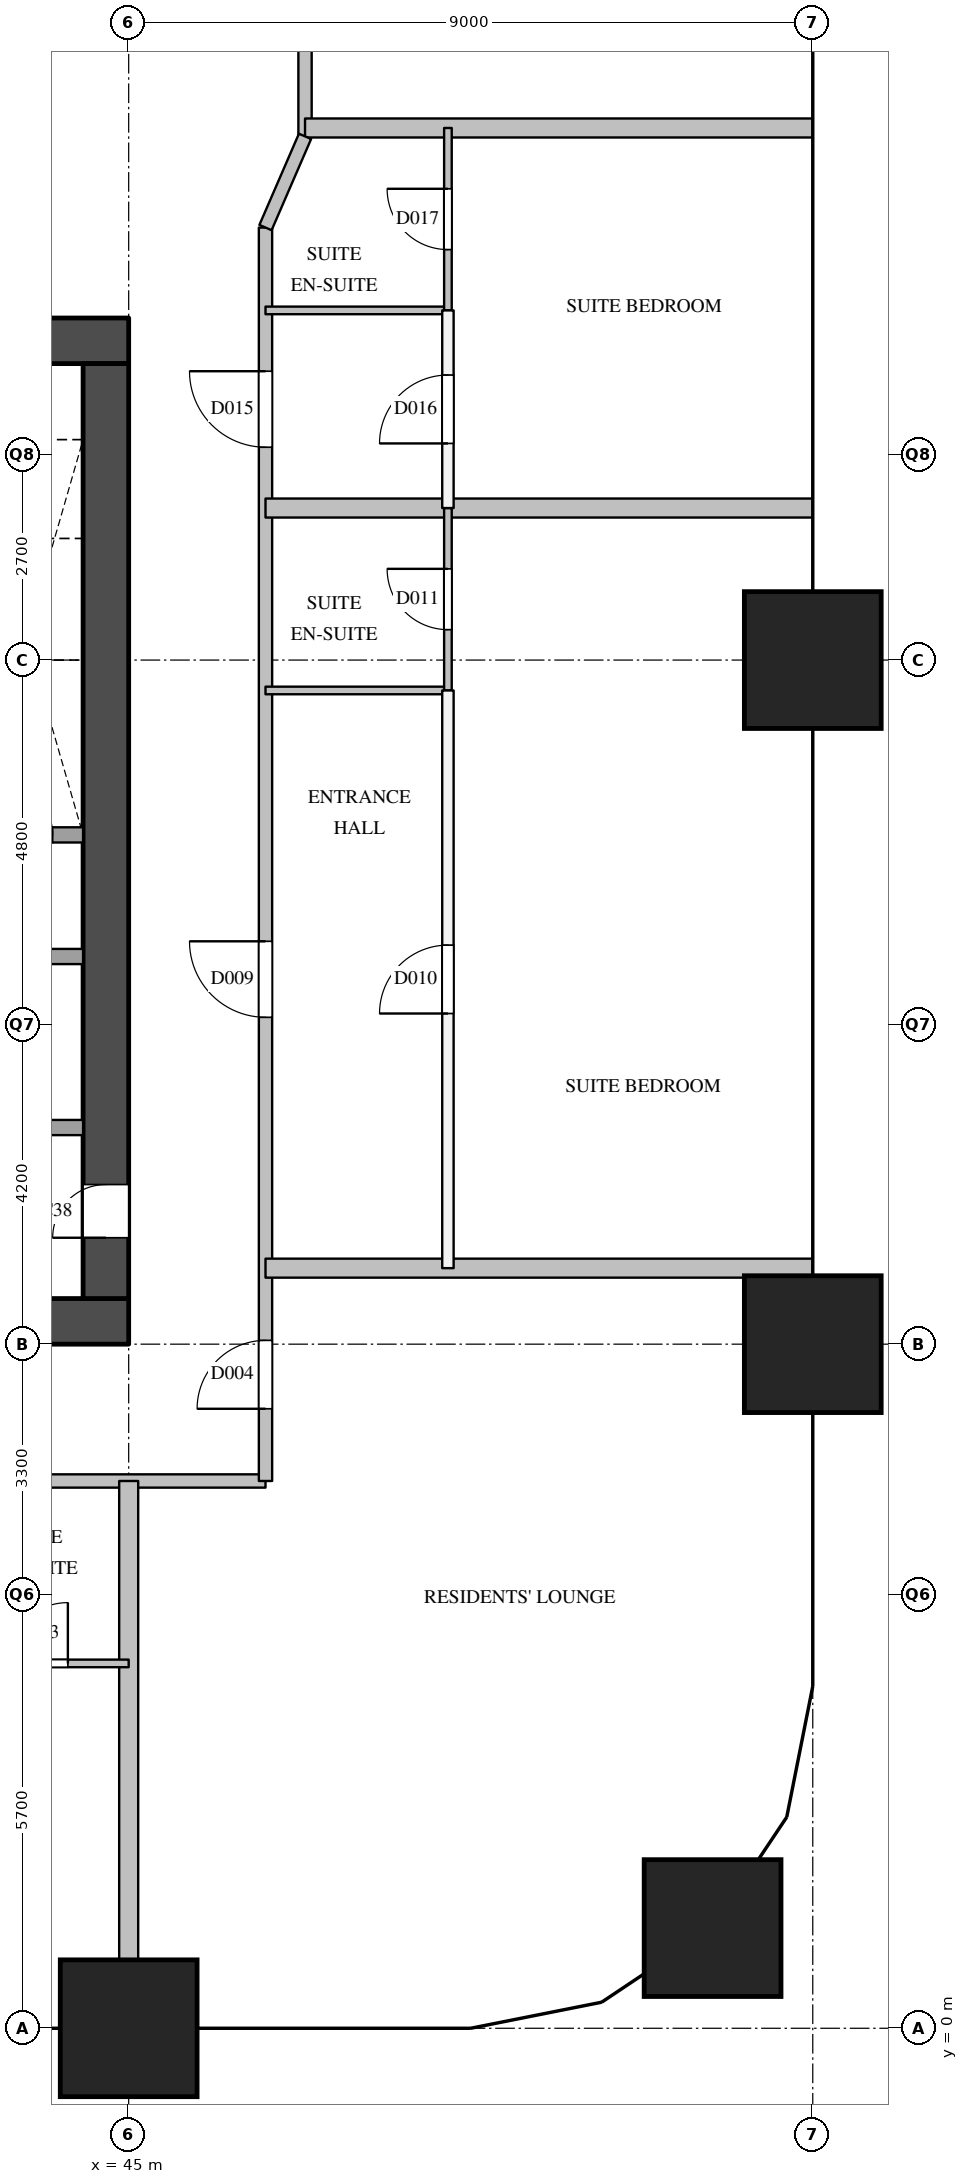
"""IFC4 building model, lengths in metres.
Left out: names, types, materials, properties, quantities, classifications, styles, units other than length and angle.
Written with IfcOpenShell. Run it as: python <this file> out.ifc"""

import sys

from ifc_helpers import new_model, si_unit, direction, frame, frame_2d, origin, origin_2d, place, context, subcontext, project, spatial, rectangle, extrude, element, fill, save


model = new_model("IFC4")
c1 = context("Model", 3, precision=1e-05, world=origin(), true_north=direction((0.0, 1.0)))
c2 = subcontext(c1, "Body", "Model", "MODEL_VIEW")
j1 = project(units=[si_unit("LENGTHUNIT", "METRE"), si_unit("PLANEANGLEUNIT", "RADIAN")], contexts=[c1])
p1 = place(None, origin())
s1 = spatial("IfcSite", under=j1, at=p1, CompositionType="ELEMENT")
p2 = place(p1, origin())
s2 = spatial("IfcBuilding", under=s1, at=p2, CompositionType="ELEMENT")
p3 = place(p2, frame((0.0, 0.0, 119.6)))
s3 = spatial("IfcBuildingStorey", under=s2, at=p3, CompositionType="ELEMENT", Elevation=119.6)
for number, where, z_axis, x_axis in (
    (1, (45.0, 0.0, 0.0), (0.0, 0.0, 1.0), (1.0, 0.0, 0.0)),
    (2, (52.682, 1.318, 0.0), (0.0, 0.0, 1.0), (1.0, 0.0, 0.0)),
    (3, (54.0, 9.0, 0.0), (0.0, 0.0, 1.0), (1.0, 0.0, 0.0)),
    (4, (54.0, 18.0, 0.0), (0.0, 0.0, 1.0), (1.0, 0.0, 0.0)),
):
    element("IfcColumn", number, at=place(p3, frame(where, z_axis=z_axis, x_axis=x_axis)), inside=s3, PredefinedType="COLUMN", context=c2, shape_type="SweptSolid", body=[
        extrude(rectangle(XDim=1.8, YDim=1.8, at=origin_2d()), origin(), (0.0, 0.0, 1.0), 3.8),
    ])
for number, where, z_axis, x_axis in (
    (5, (36.0, 9.3, 0.0), (0.0, 0.0, 1.0), (1.0, 0.0, 0.0)),
    (6, (36.0, 22.2, 0.0), (0.0, 0.0, 1.0), (1.0, 0.0, 0.0)),
):
    element("IfcWall", number, at=place(p3, frame(where, z_axis=z_axis, x_axis=x_axis)), inside=s3, PredefinedType="SHEAR", context=c2, shape_type="SweptSolid", body=[
        extrude(rectangle(XDim=9.0, YDim=0.6, at=frame_2d((4.5, 0.0))), origin(), (0.0, 0.0, 1.0), 3.3),
    ])
p4 = place(p3, frame((44.7, 9.6, 0.0), z_axis=(0.0, 0.0, 1.0), x_axis=(0.0, 1.0, 0.0)))
e7 = element("IfcWall", 7, at=p4, inside=s3, PredefinedType="SHEAR", context=c2, shape_type="SweptSolid", body=[
    extrude(rectangle(XDim=12.3, YDim=0.6, at=frame_2d((6.15, 0.0))), origin(), (0.0, 0.0, 1.0), 3.3),
])
p5 = place(p4, frame((0.8, 0.0, 0.0)))
e8 = element("IfcOpeningElement", 8, at=p5, cuts=e7, PredefinedType="OPENING", context=c2, shape_type="SweptSolid", body=[
    extrude(rectangle(XDim=0.7, YDim=2.1, at=frame_2d((0.35, 1.05))), frame((0.0, 0.31, 0.0), z_axis=(0.0, -1.0, 0.0), x_axis=(1.0, 0.0, 0.0)), (0.0, 0.0, 1.0), 0.62),
])
p6 = place(p3, frame((36.6, 11.85, 0.0), z_axis=(0.0, 0.0, 1.0), x_axis=(1.0, 0.0, 0.0)))
e9 = element("IfcWall", 9, at=p6, inside=s3, PredefinedType="SOLIDWALL", context=c2, shape_type="SweptSolid", body=[
    extrude(rectangle(XDim=7.8, YDim=0.2, at=frame_2d((3.9, 0.0))), origin(), (0.0, 0.0, 1.0), 3.3),
])
p7 = place(p3, frame((42.6, 14.1, 0.0), z_axis=(0.0, 0.0, 1.0), x_axis=(1.0, 0.0, 0.0)))
e10 = element("IfcWall", 10, at=p7, inside=s3, PredefinedType="SOLIDWALL", context=c2, shape_type="SweptSolid", body=[
    extrude(rectangle(XDim=1.8, YDim=0.2, at=frame_2d((0.9, 0.0))), origin(), (0.0, 0.0, 1.0), 3.3),
])
p8 = place(p7, frame((0.55, 0.0, 0.0)))
e11 = element("IfcOpeningElement", 11, at=p8, cuts=e10, PredefinedType="OPENING", context=c2, shape_type="SweptSolid", body=[
    extrude(rectangle(XDim=0.7, YDim=2.1, at=frame_2d((0.35, 1.05))), frame((0.0, 0.11, 0.0), z_axis=(0.0, -1.0, 0.0), x_axis=(1.0, 0.0, 0.0)), (0.0, 0.0, 1.0), 0.22),
])
p9 = place(p3, frame((42.9, 15.7, 0.0), z_axis=(0.0, 0.0, 1.0), x_axis=(1.0, 0.0, 0.0)))
e12 = element("IfcWall", 12, at=p9, inside=s3, PredefinedType="SOLIDWALL", context=c2, shape_type="SweptSolid", body=[
    extrude(rectangle(XDim=1.5, YDim=0.2, at=frame_2d((0.75, 0.0))), origin(), (0.0, 0.0, 1.0), 3.3),
])
p10 = place(p9, frame((0.4, 0.0, 0.0)))
e13 = element("IfcOpeningElement", 13, at=p10, cuts=e12, PredefinedType="OPENING", context=c2, shape_type="SweptSolid", body=[
    extrude(rectangle(XDim=0.7, YDim=2.1, at=frame_2d((0.35, 1.05))), frame((0.0, 0.11, 0.0), z_axis=(0.0, -1.0, 0.0), x_axis=(1.0, 0.0, 0.0)), (0.0, 0.0, 1.0), 0.22),
])
p11 = place(p3, frame((34.2, 7.2, 0.0), z_axis=(0.0, 0.0, 1.0), x_axis=(1.0, 0.0, 0.0)))
e14 = element("IfcWall", 14, at=p11, inside=s3, PredefinedType="PARTITIONING", context=c2, shape_type="SweptSolid", body=[
    extrude(rectangle(XDim=12.6, YDim=0.175, at=frame_2d((6.3, 0.0))), origin(), (0.0, 0.0, 1.0), 3.3),
])
p12 = place(p11, frame((6.6, 0.0, 0.0)))
e15 = element("IfcOpeningElement", 15, at=p12, cuts=e14, PredefinedType="OPENING", context=c2, shape_type="SweptSolid", body=[
    extrude(rectangle(XDim=1.0, YDim=2.1, at=frame_2d((0.5, 1.05))), frame((0.0, 0.097, 0.0), z_axis=(0.0, -1.0, 0.0), x_axis=(1.0, 0.0, 0.0)), (0.0, 0.0, 1.0), 0.195),
])
p13 = place(p11, frame((2.8, 0.0, 0.0)))
e16 = element("IfcOpeningElement", 16, at=p13, cuts=e14, PredefinedType="OPENING", context=c2, shape_type="SweptSolid", body=[
    extrude(rectangle(XDim=1.0, YDim=2.1, at=frame_2d((0.5, 1.05))), frame((0.0, 0.097, 0.0), z_axis=(0.0, -1.0, 0.0), x_axis=(1.0, 0.0, 0.0)), (0.0, 0.0, 1.0), 0.195),
])
p14 = place(p3, frame((46.8, 7.2, 0.0), z_axis=(0.0, 0.0, 1.0), x_axis=(0.0, 1.0, 0.0)))
e17 = element("IfcWall", 17, at=p14, inside=s3, PredefinedType="PARTITIONING", context=c2, shape_type="SweptSolid", body=[
    extrude(rectangle(XDim=16.49, YDim=0.175, at=frame_2d((8.245, 0.0))), origin(), (0.0, 0.0, 1.0), 3.3),
])
p15 = place(p14, frame((0.95, 0.0, 0.0)))
e18 = element("IfcOpeningElement", 18, at=p15, cuts=e17, PredefinedType="OPENING", context=c2, shape_type="SweptSolid", body=[
    extrude(rectangle(XDim=0.9, YDim=2.1, at=frame_2d((0.45, 1.05))), frame((0.0, 0.097, 0.0), z_axis=(0.0, -1.0, 0.0), x_axis=(1.0, 0.0, 0.0)), (0.0, 0.0, 1.0), 0.195),
])
p16 = place(p14, frame((6.1, 0.0, 0.0)))
e19 = element("IfcOpeningElement", 19, at=p16, cuts=e17, PredefinedType="OPENING", context=c2, shape_type="SweptSolid", body=[
    extrude(rectangle(XDim=1.0, YDim=2.1, at=frame_2d((0.5, 1.05))), frame((0.0, 0.097, 0.0), z_axis=(0.0, -1.0, 0.0), x_axis=(1.0, 0.0, 0.0)), (0.0, 0.0, 1.0), 0.195),
])
p17 = place(p14, frame((13.6, 0.0, 0.0)))
e20 = element("IfcOpeningElement", 20, at=p17, cuts=e17, PredefinedType="OPENING", context=c2, shape_type="SweptSolid", body=[
    extrude(rectangle(XDim=1.0, YDim=2.1, at=frame_2d((0.5, 1.05))), frame((0.0, 0.097, 0.0), z_axis=(0.0, -1.0, 0.0), x_axis=(1.0, 0.0, 0.0)), (0.0, 0.0, 1.0), 0.195),
])
p18 = place(p3, frame((47.32, 24.89, 0.0), z_axis=(0.0, 0.0, 1.0), x_axis=(0.0, 1.0, 0.0)))
e21 = element("IfcWall", 21, at=p18, inside=s3, PredefinedType="PARTITIONING", context=c2, shape_type="SweptSolid", body=[
    extrude(rectangle(XDim=1.81, YDim=0.175, at=frame_2d((0.905, 0.0))), origin(), (0.0, 0.0, 1.0), 2.3),
])
p19 = place(p3, frame((49.2, 10.0, 0.0), z_axis=(0.0, 0.0, 1.0), x_axis=(0.0, 1.0, 0.0)))
e22 = element("IfcWall", 22, at=p19, inside=s3, PredefinedType="PARTITIONING", context=c2, shape_type="SweptSolid", body=[
    extrude(rectangle(XDim=7.6, YDim=0.15, at=frame_2d((3.8, 0.0))), origin(), (0.0, 0.0, 1.0), 3.3),
])
p20 = place(p19, frame((3.35, 0.0, 0.0)))
e23 = element("IfcOpeningElement", 23, at=p20, cuts=e22, PredefinedType="OPENING", context=c2, shape_type="SweptSolid", body=[
    extrude(rectangle(XDim=0.9, YDim=2.1, at=frame_2d((0.45, 1.05))), frame((0.0, 0.085, 0.0), z_axis=(0.0, -1.0, 0.0), x_axis=(1.0, 0.0, 0.0)), (0.0, 0.0, 1.0), 0.17),
])
p21 = place(p3, frame((49.2, 20.0, 0.0), z_axis=(0.0, 0.0, 1.0), x_axis=(0.0, 1.0, 0.0)))
e24 = element("IfcWall", 24, at=p21, inside=s3, PredefinedType="PARTITIONING", context=c2, shape_type="SweptSolid", body=[
    extrude(rectangle(XDim=2.6, YDim=0.15, at=frame_2d((1.3, 0.0))), origin(), (0.0, 0.0, 1.0), 3.3),
])
p22 = place(p21, frame((0.85, 0.0, 0.0)))
e25 = element("IfcOpeningElement", 25, at=p22, cuts=e24, PredefinedType="OPENING", context=c2, shape_type="SweptSolid", body=[
    extrude(rectangle(XDim=0.9, YDim=2.1, at=frame_2d((0.45, 1.05))), frame((0.0, 0.085, 0.0), z_axis=(0.0, -1.0, 0.0), x_axis=(1.0, 0.0, 0.0)), (0.0, 0.0, 1.0), 0.17),
])
for number, where, z_axis, x_axis in (
    (26, (46.8, 10.0, 0.0), (0.0, 0.0, 1.0), (1.0, 0.0, 0.0)),
    (27, (46.8, 20.0, 0.0), (0.0, 0.0, 1.0), (1.0, 0.0, 0.0)),
):
    element("IfcWall", number, at=place(p3, frame(where, z_axis=z_axis, x_axis=x_axis)), inside=s3, PredefinedType="PARTITIONING", context=c2, shape_type="SweptSolid", body=[
        extrude(rectangle(XDim=7.2, YDim=0.25, at=frame_2d((3.6, 0.0))), origin(), (0.0, 0.0, 1.0), 2.3),
    ])
p23 = place(p3, frame((47.32, 25.0, 0.0), z_axis=(0.0, 0.0, 1.0), x_axis=(1.0, 0.0, 0.0)))
e28 = element("IfcWall", 28, at=p23, inside=s3, PredefinedType="PARTITIONING", context=c2, shape_type="SweptSolid", body=[
    extrude(rectangle(XDim=6.68, YDim=0.25, at=frame_2d((3.34, 0.0))), origin(), (0.0, 0.0, 1.0), 2.3),
])
p24 = place(p3, frame((45.0, 0.0, 0.0), z_axis=(0.0, 0.0, 1.0), x_axis=(0.0, 1.0, 0.0)))
e29 = element("IfcWall", 29, at=p24, inside=s3, PredefinedType="PARTITIONING", context=c2, shape_type="SweptSolid", body=[
    extrude(rectangle(XDim=7.2, YDim=0.25, at=frame_2d((3.6, 0.0))), origin(), (0.0, 0.0, 1.0), 3.3),
])
p25 = place(p3, frame((42.6, 4.8, 0.0), z_axis=(0.0, 0.0, 1.0), x_axis=(1.0, 0.0, 0.0)))
e30 = element("IfcWall", 30, at=p25, inside=s3, PredefinedType="PARTITIONING", context=c2, shape_type="SweptSolid", body=[
    extrude(rectangle(XDim=2.4, YDim=0.1, at=frame_2d((1.2, 0.0))), origin(), (0.0, 0.0, 1.0), 3.3),
])
p26 = place(p25, frame((0.8, 0.0, 0.0)))
e31 = element("IfcOpeningElement", 31, at=p26, cuts=e30, PredefinedType="OPENING", context=c2, shape_type="SweptSolid", body=[
    extrude(rectangle(XDim=0.8, YDim=2.1, at=frame_2d((0.4, 1.05))), frame((0.0, 0.06, 0.0), z_axis=(0.0, -1.0, 0.0), x_axis=(1.0, 0.0, 0.0)), (0.0, 0.0, 1.0), 0.12),
])
for number, where, z_axis, x_axis in (
    (32, (46.8, 17.6, 0.0), (0.0, 0.0, 1.0), (1.0, 0.0, 0.0)),
    (33, (46.8, 22.6, 0.0), (0.0, 0.0, 1.0), (1.0, 0.0, 0.0)),
):
    element("IfcWall", number, at=place(p3, frame(where, z_axis=z_axis, x_axis=x_axis)), inside=s3, PredefinedType="PARTITIONING", context=c2, shape_type="SweptSolid", body=[
        extrude(rectangle(XDim=2.4, YDim=0.1, at=frame_2d((1.2, 0.0))), origin(), (0.0, 0.0, 1.0), 3.3),
    ])
p27 = place(p3, frame((49.2, 17.6, 0.0), z_axis=(0.0, 0.0, 1.0), x_axis=(0.0, 1.0, 0.0)))
e34 = element("IfcWall", 34, at=p27, inside=s3, PredefinedType="PARTITIONING", context=c2, shape_type="SweptSolid", body=[
    extrude(rectangle(XDim=2.4, YDim=0.1, at=frame_2d((1.2, 0.0))), origin(), (0.0, 0.0, 1.0), 3.3),
])
p28 = place(p27, frame((0.8, 0.0, 0.0)))
e35 = element("IfcOpeningElement", 35, at=p28, cuts=e34, PredefinedType="OPENING", context=c2, shape_type="SweptSolid", body=[
    extrude(rectangle(XDim=0.8, YDim=2.1, at=frame_2d((0.4, 1.05))), frame((0.0, 0.06, 0.0), z_axis=(0.0, -1.0, 0.0), x_axis=(1.0, 0.0, 0.0)), (0.0, 0.0, 1.0), 0.12),
])
p29 = place(p3, frame((49.2, 22.6, 0.0), z_axis=(0.0, 0.0, 1.0), x_axis=(0.0, 1.0, 0.0)))
e36 = element("IfcWall", 36, at=p29, inside=s3, PredefinedType="PARTITIONING", context=c2, shape_type="SweptSolid", body=[
    extrude(rectangle(XDim=2.4, YDim=0.1, at=frame_2d((1.2, 0.0))), origin(), (0.0, 0.0, 1.0), 3.3),
])
p30 = place(p29, frame((0.8, 0.0, 0.0)))
e37 = element("IfcOpeningElement", 37, at=p30, cuts=e36, PredefinedType="OPENING", context=c2, shape_type="SweptSolid", body=[
    extrude(rectangle(XDim=0.8, YDim=2.1, at=frame_2d((0.4, 1.05))), frame((0.0, 0.06, 0.0), z_axis=(0.0, -1.0, 0.0), x_axis=(1.0, 0.0, 0.0)), (0.0, 0.0, 1.0), 0.12),
])
p31 = place(p3, frame((47.32, 24.89, 0.0), z_axis=(0.0, 0.0, 1.0), x_axis=(-0.397633632391, -0.917544273804, 0.0)))
e38 = element("IfcWall", 38, at=p31, inside=s3, PredefinedType="PARTITIONING", context=c2, shape_type="SweptSolid", body=[
    extrude(rectangle(XDim=1.308, YDim=0.175, at=frame_2d((0.654, 0.0))), origin(), (0.0, 0.0, 1.0), 3.3),
])
p32 = place(p5, origin())
e39 = element("IfcDoor", 39, at=p32, inside=s3, OperationType="SINGLE_SWING_LEFT", PredefinedType="DOOR", context=c2, shape_type="SweptSolid", body=[
    extrude(rectangle(XDim=0.7, YDim=2.1, at=frame_2d((0.35, 1.05))), frame((0.0, 0.025, 0.0), z_axis=(0.0, -1.0, 0.0), x_axis=(1.0, 0.0, 0.0)), (0.0, 0.0, 1.0), 0.05),
])
fill(e8, e39)
p33 = place(p26, origin())
e40 = element("IfcDoor", 40, at=p33, inside=s3, OperationType="SINGLE_SWING_RIGHT", PredefinedType="DOOR", context=c2, shape_type="SweptSolid", body=[
    extrude(rectangle(XDim=0.8, YDim=2.1, at=frame_2d((0.4, 1.05))), frame((0.0, 0.025, 0.0), z_axis=(0.0, -1.0, 0.0), x_axis=(1.0, 0.0, 0.0)), (0.0, 0.0, 1.0), 0.05),
])
fill(e31, e40)
p34 = place(p15, origin())
e41 = element("IfcDoor", 41, at=p34, inside=s3, OperationType="SINGLE_SWING_LEFT", PredefinedType="DOOR", context=c2, shape_type="SweptSolid", body=[
    extrude(rectangle(XDim=0.9, YDim=2.1, at=frame_2d((0.45, 1.05))), frame((0.0, 0.025, 0.0), z_axis=(0.0, -1.0, 0.0), x_axis=(1.0, 0.0, 0.0)), (0.0, 0.0, 1.0), 0.05),
])
fill(e18, e41)
p35 = place(p16, origin())
e42 = element("IfcDoor", 42, at=p35, inside=s3, OperationType="SINGLE_SWING_RIGHT", PredefinedType="DOOR", context=c2, shape_type="SweptSolid", body=[
    extrude(rectangle(XDim=1.0, YDim=2.1, at=frame_2d((0.5, 1.05))), frame((0.0, 0.025, 0.0), z_axis=(0.0, -1.0, 0.0), x_axis=(1.0, 0.0, 0.0)), (0.0, 0.0, 1.0), 0.05),
])
fill(e19, e42)
p36 = place(p20, origin())
e43 = element("IfcDoor", 43, at=p36, inside=s3, OperationType="SINGLE_SWING_LEFT", PredefinedType="DOOR", context=c2, shape_type="SweptSolid", body=[
    extrude(rectangle(XDim=0.9, YDim=2.1, at=frame_2d((0.45, 1.05))), frame((0.0, 0.025, 0.0), z_axis=(0.0, -1.0, 0.0), x_axis=(1.0, 0.0, 0.0)), (0.0, 0.0, 1.0), 0.05),
])
fill(e23, e43)
p37 = place(p28, origin())
e44 = element("IfcDoor", 44, at=p37, inside=s3, OperationType="SINGLE_SWING_RIGHT", PredefinedType="DOOR", context=c2, shape_type="SweptSolid", body=[
    extrude(rectangle(XDim=0.8, YDim=2.1, at=frame_2d((0.4, 1.05))), frame((0.0, 0.025, 0.0), z_axis=(0.0, -1.0, 0.0), x_axis=(1.0, 0.0, 0.0)), (0.0, 0.0, 1.0), 0.05),
])
fill(e35, e44)
p38 = place(p17, origin())
e45 = element("IfcDoor", 45, at=p38, inside=s3, OperationType="SINGLE_SWING_RIGHT", PredefinedType="DOOR", context=c2, shape_type="SweptSolid", body=[
    extrude(rectangle(XDim=1.0, YDim=2.1, at=frame_2d((0.5, 1.05))), frame((0.0, 0.025, 0.0), z_axis=(0.0, -1.0, 0.0), x_axis=(1.0, 0.0, 0.0)), (0.0, 0.0, 1.0), 0.05),
])
fill(e20, e45)
p39 = place(p22, origin())
e46 = element("IfcDoor", 46, at=p39, inside=s3, OperationType="SINGLE_SWING_LEFT", PredefinedType="DOOR", context=c2, shape_type="SweptSolid", body=[
    extrude(rectangle(XDim=0.9, YDim=2.1, at=frame_2d((0.45, 1.05))), frame((0.0, 0.025, 0.0), z_axis=(0.0, -1.0, 0.0), x_axis=(1.0, 0.0, 0.0)), (0.0, 0.0, 1.0), 0.05),
])
fill(e25, e46)
p40 = place(p30, origin())
e47 = element("IfcDoor", 47, at=p40, inside=s3, OperationType="SINGLE_SWING_RIGHT", PredefinedType="DOOR", context=c2, shape_type="SweptSolid", body=[
    extrude(rectangle(XDim=0.8, YDim=2.1, at=frame_2d((0.4, 1.05))), frame((0.0, 0.025, 0.0), z_axis=(0.0, -1.0, 0.0), x_axis=(1.0, 0.0, 0.0)), (0.0, 0.0, 1.0), 0.05),
])
fill(e37, e47)
save(model, sys.argv[1])
